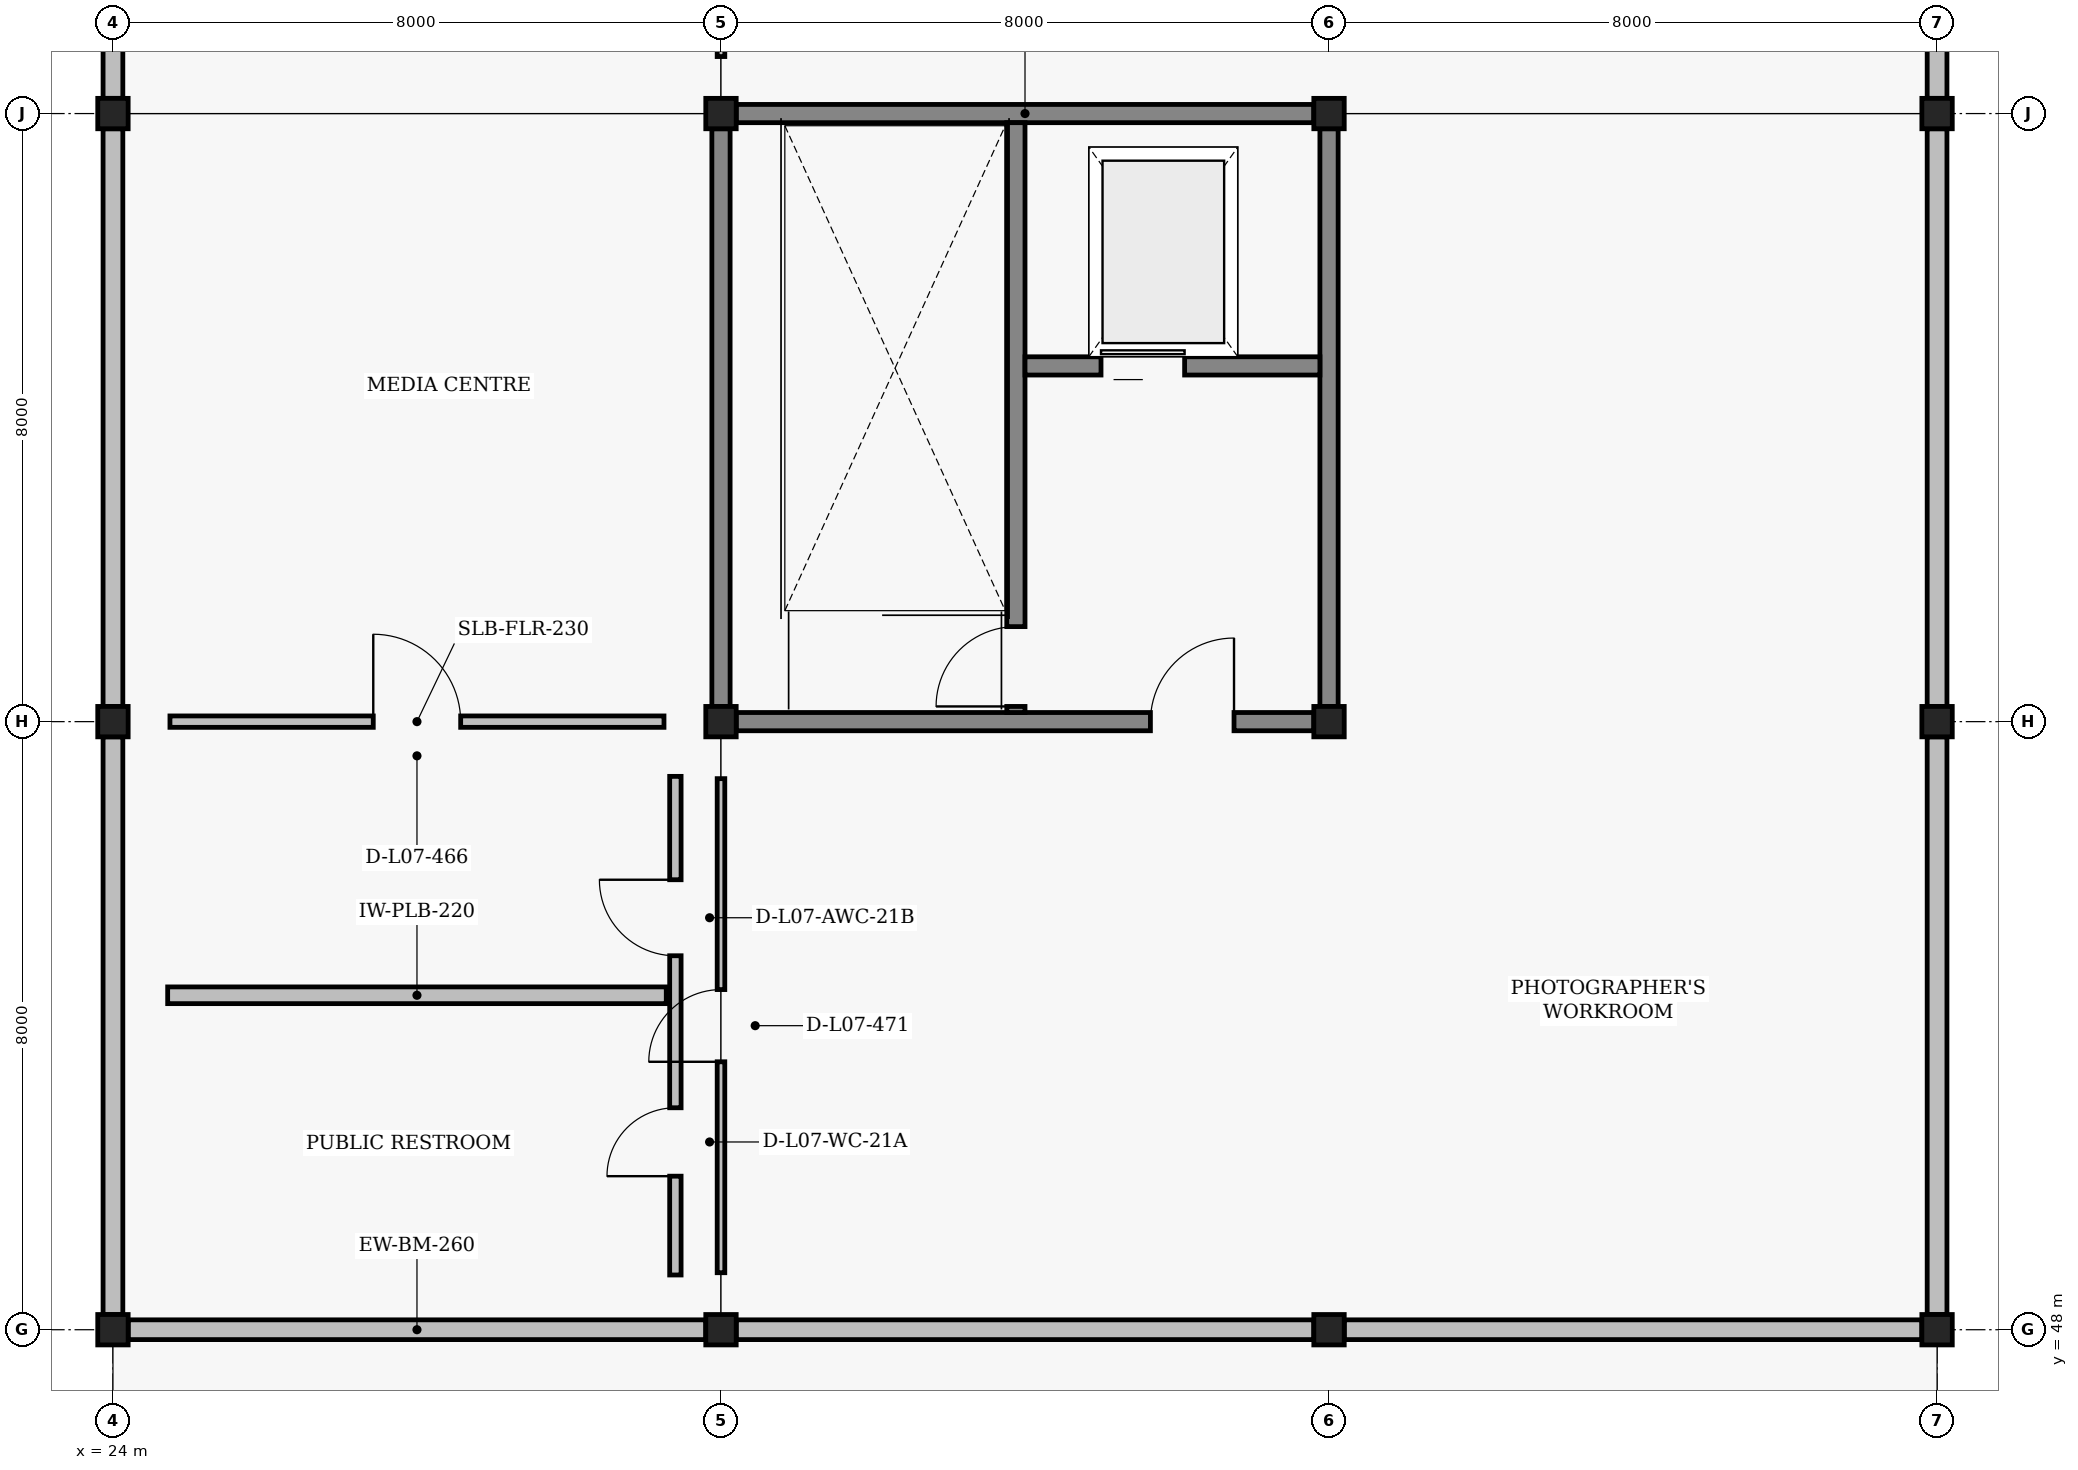
"""IFC4 building model, lengths in metres.
Left out: names, types, materials, properties, quantities, classifications, styles, units other than length and angle.
Written with IfcOpenShell. Run it as: python <this file> out.ifc"""

import sys

from ifc_helpers import new_model, si_unit, direction, frame, frame_2d, origin, origin_2d, place, context, subcontext, project, spatial, rectangle, i_section, extrude, element, fill, save


model = new_model("IFC4")
c1 = context("Model", 3, precision=1e-05, world=origin(), true_north=direction((0.0, 1.0)))
c2 = subcontext(c1, "Body", "Model", "MODEL_VIEW")
j1 = project(units=[si_unit("LENGTHUNIT", "METRE"), si_unit("PLANEANGLEUNIT", "RADIAN")], contexts=[c1])
p1 = place(None, origin())
s1 = spatial("IfcSite", under=j1, at=p1, CompositionType="ELEMENT")
p2 = place(p1, origin())
s2 = spatial("IfcBuilding", under=s1, at=p2, CompositionType="ELEMENT")
p3 = place(p2, frame((0.0, 0.0, 27.0)))
s3 = spatial("IfcBuildingStorey", under=s2, at=p3, CompositionType="ELEMENT", Elevation=27.0)
for number, where, z_axis, x_axis in (
    (1, (24.0, 48.0, 0.0), (0.0, 0.0, 1.0), (1.0, 0.0, 0.0)),
    (2, (24.0, 56.0, 0.0), (0.0, 0.0, 1.0), (1.0, 0.0, 0.0)),
    (3, (24.0, 64.0, 0.0), (0.0, 0.0, 1.0), (1.0, 0.0, 0.0)),
    (4, (32.0, 48.0, 0.0), (0.0, 0.0, 1.0), (1.0, 0.0, 0.0)),
    (5, (32.0, 56.0, 0.0), (0.0, 0.0, 1.0), (1.0, 0.0, 0.0)),
    (6, (32.0, 64.0, 0.0), (0.0, 0.0, 1.0), (1.0, 0.0, 0.0)),
    (7, (40.0, 48.0, 0.0), (0.0, 0.0, 1.0), (1.0, 0.0, 0.0)),
    (8, (40.0, 56.0, 0.0), (0.0, 0.0, 1.0), (1.0, 0.0, 0.0)),
    (9, (40.0, 64.0, 0.0), (0.0, 0.0, 1.0), (1.0, 0.0, 0.0)),
    (10, (48.0, 48.0, 0.0), (0.0, 0.0, 1.0), (1.0, 0.0, 0.0)),
    (11, (48.0, 56.0, 0.0), (0.0, 0.0, 1.0), (1.0, 0.0, 0.0)),
    (12, (48.0, 64.0, 0.0), (0.0, 0.0, 1.0), (1.0, 0.0, 0.0)),
):
    element("IfcColumn", number, at=place(p3, frame(where, z_axis=z_axis, x_axis=x_axis)), inside=s3, PredefinedType="COLUMN", context=c2, shape_type="SweptSolid", body=[
        extrude(i_section(OverallWidth=0.4, OverallDepth=0.4, WebThickness=0.013, FlangeThickness=0.021, at=origin_2d()), origin(), (0.0, 0.0, 1.0), 4.2),
    ])
for number, where, z_axis, x_axis in (
    (13, (24.2, 48.0, 0.0), (0.0, 0.0, 1.0), (1.0, 0.0, 0.0)),
    (14, (24.0, 48.2, 0.0), (0.0, 0.0, 1.0), (0.0, 1.0, 0.0)),
    (15, (24.0, 56.2, 0.0), (0.0, 0.0, 1.0), (0.0, 1.0, 0.0)),
    (16, (24.0, 64.2, 0.0), (0.0, 0.0, 1.0), (0.0, 1.0, 0.0)),
    (17, (32.2, 48.0, 0.0), (0.0, 0.0, 1.0), (1.0, 0.0, 0.0)),
    (18, (40.2, 48.0, 0.0), (0.0, 0.0, 1.0), (1.0, 0.0, 0.0)),
    (19, (48.0, 48.2, 0.0), (0.0, 0.0, 1.0), (0.0, 1.0, 0.0)),
    (20, (48.0, 56.2, 0.0), (0.0, 0.0, 1.0), (0.0, 1.0, 0.0)),
    (21, (48.0, 64.2, 0.0), (0.0, 0.0, 1.0), (0.0, 1.0, 0.0)),
):
    element("IfcWall", number, at=place(p3, frame(where, z_axis=z_axis, x_axis=x_axis)), inside=s3, PredefinedType="SOLIDWALL", context=c2, shape_type="SweptSolid", body=[
        extrude(rectangle(XDim=7.6, YDim=0.26, at=frame_2d((3.8, 0.0))), origin(), (0.0, 0.0, 1.0), 3.35),
    ])
p4 = place(p3, frame((32.2, 56.0, 0.0), z_axis=(0.0, 0.0, 1.0), x_axis=(1.0, 0.0, 0.0)))
e22 = element("IfcWall", 22, at=p4, inside=s3, PredefinedType="SHEAR", context=c2, shape_type="SweptSolid", body=[
    extrude(rectangle(XDim=7.6, YDim=0.24, at=frame_2d((3.8, 0.0))), origin(), (0.0, 0.0, 1.0), 3.37),
])
p5 = place(p4, frame((5.45, 0.0, 0.0)))
e23 = element("IfcOpeningElement", 23, at=p5, cuts=e22, PredefinedType="OPENING", context=c2, shape_type="SweptSolid", body=[
    extrude(rectangle(XDim=1.1, YDim=2.2, at=frame_2d((0.55, 1.1))), frame((0.0, 0.13, 0.0), z_axis=(0.0, -1.0, 0.0), x_axis=(1.0, 0.0, 0.0)), (0.0, 0.0, 1.0), 0.26),
])
for number, where, z_axis, x_axis in (
    (24, (32.2, 64.0, 0.0), (0.0, 0.0, 1.0), (1.0, 0.0, 0.0)),
    (25, (32.0, 56.2, 0.0), (0.0, 0.0, 1.0), (0.0, 1.0, 0.0)),
    (26, (40.0, 56.2, 0.0), (0.0, 0.0, 1.0), (0.0, 1.0, 0.0)),
):
    element("IfcWall", number, at=place(p3, frame(where, z_axis=z_axis, x_axis=x_axis)), inside=s3, PredefinedType="SHEAR", context=c2, shape_type="SweptSolid", body=[
        extrude(rectangle(XDim=7.6, YDim=0.24, at=frame_2d((3.8, 0.0))), origin(), (0.0, 0.0, 1.0), 3.37),
    ])
p6 = place(p3, frame((35.88, 56.12, 0.0), z_axis=(0.0, 0.0, 1.0), x_axis=(0.0, 1.0, 0.0)))
e27 = element("IfcWall", 27, at=p6, inside=s3, PredefinedType="SHEAR", context=c2, shape_type="SweptSolid", body=[
    extrude(rectangle(XDim=7.76, YDim=0.24, at=frame_2d((3.88, 0.0))), origin(), (0.0, 0.0, 1.0), 3.47),
])
p7 = place(p6, frame((0.08, 0.0, 0.0)))
e28 = element("IfcOpeningElement", 28, at=p7, cuts=e27, PredefinedType="OPENING", context=c2, shape_type="SweptSolid", body=[
    extrude(rectangle(XDim=1.05, YDim=2.15, at=frame_2d((0.525, 1.075))), frame((0.0, 0.13, 0.0), z_axis=(0.0, -1.0, 0.0), x_axis=(1.0, 0.0, 0.0)), (0.0, 0.0, 1.0), 0.26),
])
p8 = place(p3, frame((36.0, 60.68, 0.0), z_axis=(0.0, 0.0, 1.0), x_axis=(1.0, 0.0, 0.0)))
e29 = element("IfcWall", 29, at=p8, inside=s3, PredefinedType="SHEAR", context=c2, shape_type="SweptSolid", body=[
    extrude(rectangle(XDim=3.88, YDim=0.24, at=frame_2d((1.94, 0.0))), origin(), (0.0, 0.0, 1.0), 3.37),
])
p9 = place(p8, frame((1.0, 0.0, 0.0)))
e30 = element("IfcOpeningElement", 30, at=p9, cuts=e29, PredefinedType="OPENING", context=c2, shape_type="SweptSolid", body=[
    extrude(rectangle(XDim=1.1, YDim=2.15, at=frame_2d((0.55, 1.075))), frame((0.0, 0.13, 0.0), z_axis=(0.0, -1.0, 0.0), x_axis=(1.0, 0.0, 0.0)), (0.0, 0.0, 1.0), 0.26),
])
p10 = place(p3, frame((24.72, 52.4, 0.0), z_axis=(0.0, 0.0, 1.0), x_axis=(1.0, 0.0, 0.0)))
e31 = element("IfcWall", 31, at=p10, inside=s3, PredefinedType="PLUMBINGWALL", context=c2, shape_type="SweptSolid", body=[
    extrude(rectangle(XDim=6.56, YDim=0.22, at=frame_2d((3.28, 0.0))), origin(), (0.0, 0.0, 1.0), 3.72),
])
p11 = place(p3, frame((31.4, 48.72, 0.0), z_axis=(0.0, 0.0, 1.0), x_axis=(0.0, 1.0, 0.0)))
e32 = element("IfcWall", 32, at=p11, inside=s3, PredefinedType="PARTITIONING", context=c2, shape_type="SweptSolid", body=[
    extrude(rectangle(XDim=6.56, YDim=0.15, at=frame_2d((3.28, 0.0))), origin(), (0.0, 0.0, 1.0), 3.72),
])
p12 = place(p11, frame((1.3, 0.0, 0.0)))
e33 = element("IfcOpeningElement", 33, at=p12, cuts=e32, PredefinedType="OPENING", context=c2, shape_type="SweptSolid", body=[
    extrude(rectangle(XDim=0.9, YDim=2.1, at=frame_2d((0.45, 1.05))), frame((0.0, 0.085, 0.0), z_axis=(0.0, -1.0, 0.0), x_axis=(1.0, 0.0, 0.0)), (0.0, 0.0, 1.0), 0.17),
])
p13 = place(p11, frame((4.2, 0.0, 0.0)))
e34 = element("IfcOpeningElement", 34, at=p13, cuts=e32, PredefinedType="OPENING", context=c2, shape_type="SweptSolid", body=[
    extrude(rectangle(XDim=1.0, YDim=2.15, at=frame_2d((0.5, 1.075))), frame((0.0, 0.085, 0.0), z_axis=(0.0, -1.0, 0.0), x_axis=(1.0, 0.0, 0.0)), (0.0, 0.0, 1.0), 0.17),
])
p14 = place(p3, frame((24.75, 56.0, 0.0), z_axis=(0.0, 0.0, 1.0), x_axis=(1.0, 0.0, 0.0)))
e35 = element("IfcWall", 35, at=p14, inside=s3, PredefinedType="PARTITIONING", context=c2, shape_type="SweptSolid", body=[
    extrude(rectangle(XDim=6.5, YDim=0.15, at=frame_2d((3.25, 0.0))), origin(), (0.0, 0.0, 1.0), 3.47),
])
p15 = place(p14, frame((2.675, 0.0, 0.0)))
e36 = element("IfcOpeningElement", 36, at=p15, cuts=e35, PredefinedType="OPENING", context=c2, shape_type="SweptSolid", body=[
    extrude(rectangle(XDim=1.15, YDim=2.15, at=frame_2d((0.575, 1.075))), frame((0.0, 0.085, 0.0), z_axis=(0.0, -1.0, 0.0), x_axis=(1.0, 0.0, 0.0)), (0.0, 0.0, 1.0), 0.17),
])
p16 = place(p3, frame((32.0, 64.75, 0.0), z_axis=(0.0, 0.0, 1.0), x_axis=(0.0, 1.0, 0.0)))
e37 = element("IfcWall", 37, at=p16, inside=s3, PredefinedType="PARTITIONING", context=c2, shape_type="SweptSolid", body=[
    extrude(rectangle(XDim=6.5, YDim=0.1, at=frame_2d((3.25, 0.0))), origin(), (0.0, 0.0, 1.0), 3.37),
])
p17 = place(p16, frame((2.775, 0.0, 0.0)))
e38 = element("IfcOpeningElement", 38, at=p17, cuts=e37, PredefinedType="OPENING", context=c2, shape_type="SweptSolid", body=[
    extrude(rectangle(XDim=0.95, YDim=2.1, at=frame_2d((0.475, 1.05))), frame((0.0, 0.06, 0.0), z_axis=(0.0, -1.0, 0.0), x_axis=(1.0, 0.0, 0.0)), (0.0, 0.0, 1.0), 0.12),
])
p18 = place(p3, frame((32.0, 48.75, 0.0), z_axis=(0.0, 0.0, 1.0), x_axis=(0.0, 1.0, 0.0)))
e39 = element("IfcWall", 39, at=p18, inside=s3, PredefinedType="PARTITIONING", context=c2, shape_type="SweptSolid", body=[
    extrude(rectangle(XDim=6.5, YDim=0.1, at=frame_2d((3.25, 0.0))), origin(), (0.0, 0.0, 1.0), 3.37),
])
p19 = place(p18, frame((2.775, 0.0, 0.0)))
e40 = element("IfcOpeningElement", 40, at=p19, cuts=e39, PredefinedType="OPENING", context=c2, shape_type="SweptSolid", body=[
    extrude(rectangle(XDim=0.95, YDim=2.1, at=frame_2d((0.475, 1.05))), frame((0.0, 0.06, 0.0), z_axis=(0.0, -1.0, 0.0), x_axis=(1.0, 0.0, 0.0)), (0.0, 0.0, 1.0), 0.12),
])
p20 = place(p5, origin())
e41 = element("IfcDoor", 41, at=p20, inside=s3, OperationType="SINGLE_SWING_RIGHT", PredefinedType="DOOR", context=c2, shape_type="SweptSolid", body=[
    extrude(rectangle(XDim=1.1, YDim=2.2, at=frame_2d((0.55, 1.1))), frame((0.0, 0.025, 0.0), z_axis=(0.0, -1.0, 0.0), x_axis=(1.0, 0.0, 0.0)), (0.0, 0.0, 1.0), 0.05),
])
fill(e23, e41)
p21 = place(p7, origin())
e42 = element("IfcDoor", 42, at=p21, inside=s3, OperationType="SINGLE_SWING_LEFT", PredefinedType="DOOR", context=c2, shape_type="SweptSolid", body=[
    extrude(rectangle(XDim=1.05, YDim=2.15, at=frame_2d((0.525, 1.075))), frame((0.0, 0.025, 0.0), z_axis=(0.0, -1.0, 0.0), x_axis=(1.0, 0.0, 0.0)), (0.0, 0.0, 1.0), 0.05),
])
fill(e28, e42)
p22 = place(p9, origin())
e43 = element("IfcDoor", 43, at=p22, inside=s3, OperationType="SLIDING_TO_LEFT", PredefinedType="DOOR", context=c2, shape_type="SweptSolid", body=[
    extrude(rectangle(XDim=1.1, YDim=2.15, at=frame_2d((0.55, 1.075))), frame((0.0, 0.025, 0.0), z_axis=(0.0, -1.0, 0.0), x_axis=(1.0, 0.0, 0.0)), (0.0, 0.0, 1.0), 0.05),
])
fill(e30, e43)
p23 = place(p12, origin())
e44 = element("IfcDoor", 44, at=p23, inside=s3, OperationType="SINGLE_SWING_LEFT", PredefinedType="DOOR", context=c2, shape_type="SweptSolid", body=[
    extrude(rectangle(XDim=0.9, YDim=2.1, at=frame_2d((0.45, 1.05))), frame((0.0, 0.025, 0.0), z_axis=(0.0, -1.0, 0.0), x_axis=(1.0, 0.0, 0.0)), (0.0, 0.0, 1.0), 0.05),
])
fill(e33, e44)
p24 = place(p13, origin())
e45 = element("IfcDoor", 45, at=p24, inside=s3, OperationType="SINGLE_SWING_RIGHT", PredefinedType="DOOR", context=c2, shape_type="SweptSolid", body=[
    extrude(rectangle(XDim=1.0, YDim=2.15, at=frame_2d((0.5, 1.075))), frame((0.0, 0.025, 0.0), z_axis=(0.0, -1.0, 0.0), x_axis=(1.0, 0.0, 0.0)), (0.0, 0.0, 1.0), 0.05),
])
fill(e34, e45)
p25 = place(p15, origin())
e46 = element("IfcDoor", 46, at=p25, inside=s3, OperationType="SINGLE_SWING_LEFT", PredefinedType="DOOR", context=c2, shape_type="SweptSolid", body=[
    extrude(rectangle(XDim=1.15, YDim=2.15, at=frame_2d((0.575, 1.075))), frame((0.0, 0.025, 0.0), z_axis=(0.0, -1.0, 0.0), x_axis=(1.0, 0.0, 0.0)), (0.0, 0.0, 1.0), 0.05),
])
fill(e36, e46)
p26 = place(p19, origin())
e47 = element("IfcDoor", 47, at=p26, inside=s3, OperationType="SINGLE_SWING_LEFT", PredefinedType="DOOR", context=c2, shape_type="SweptSolid", body=[
    extrude(rectangle(XDim=0.95, YDim=2.1, at=frame_2d((0.475, 1.05))), frame((0.0, 0.025, 0.0), z_axis=(0.0, -1.0, 0.0), x_axis=(1.0, 0.0, 0.0)), (0.0, 0.0, 1.0), 0.05),
])
fill(e40, e47)
save(model, sys.argv[1])
